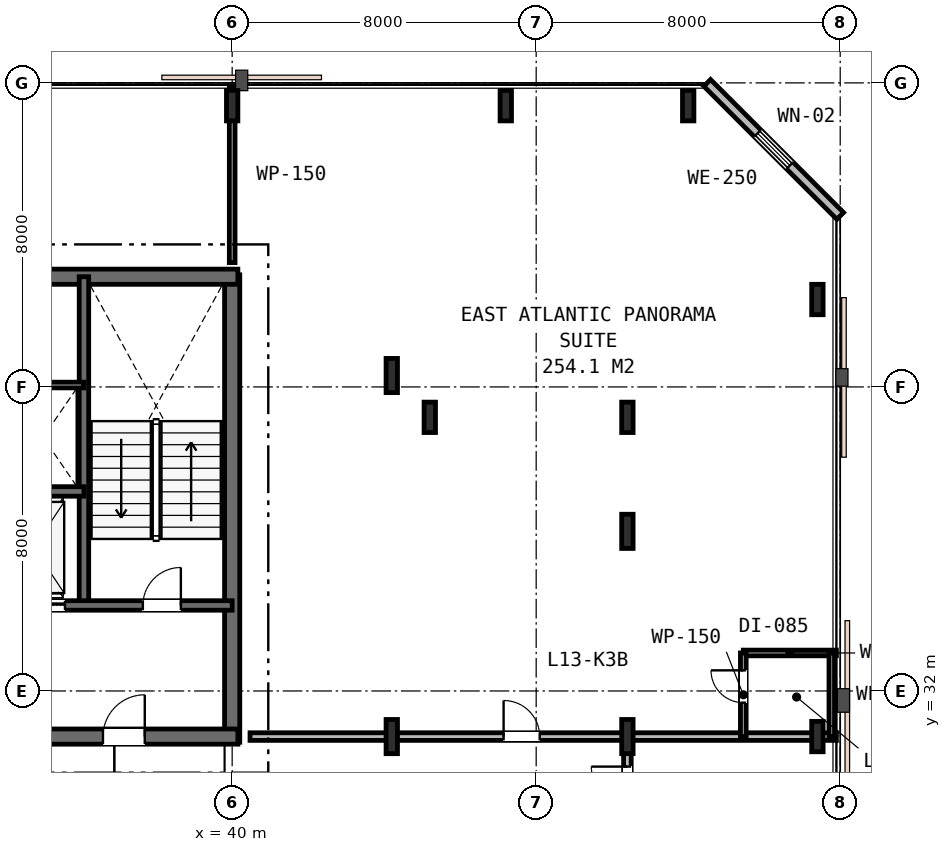
"""IFC4 building model, lengths in metres.
Left out: names, types, materials, properties, quantities, classifications, styles, units other than length and angle.
Written with IfcOpenShell. Run it as: python <this file> out.ifc"""

import sys

from ifc_helpers import new_model, si_unit, direction, frame, frame_2d, origin, origin_2d, place, context, subcontext, project, spatial, rectangle, i_section, extrude, element, fill, save


model = new_model("IFC4")
c1 = context("Model", 3, precision=1e-05, world=origin(), true_north=direction((0.0, 1.0)))
c2 = subcontext(c1, "Body", "Model", "MODEL_VIEW")
j1 = project(units=[si_unit("LENGTHUNIT", "METRE"), si_unit("PLANEANGLEUNIT", "RADIAN")], contexts=[c1])
p1 = place(None, origin())
s1 = spatial("IfcSite", under=j1, at=p1, CompositionType="ELEMENT")
p2 = place(p1, origin())
s2 = spatial("IfcBuilding", under=s1, at=p2, CompositionType="ELEMENT")
p3 = place(p2, frame((0.0, 0.0, 54.6)))
s3 = spatial("IfcBuildingStorey", under=s2, at=p3, CompositionType="ELEMENT", Elevation=54.6)
p4 = place(p3, frame((40.0, 30.65, 0.0), z_axis=(0.0, 0.0, 1.0), x_axis=(0.0, 1.0, 0.0)))
e1 = element("IfcWall", 1, at=p4, inside=s3, PredefinedType="SHEAR", context=c2, shape_type="SweptSolid", body=[
    extrude(rectangle(XDim=12.3, YDim=0.4, at=frame_2d((6.15, 0.0))), origin(), (0.0, 0.0, 1.0), 3.6),
])
p5 = place(p3, frame((15.85, 42.9, 0.0), z_axis=(0.0, 0.0, 1.0), x_axis=(1.0, 0.0, 0.0)))
e2 = element("IfcWall", 2, at=p5, inside=s3, PredefinedType="SHEAR", context=c2, shape_type="SweptSolid", body=[
    extrude(rectangle(XDim=24.3, YDim=0.4, at=frame_2d((12.15, 0.0))), origin(), (0.0, 0.0, 1.0), 3.6),
])
p6 = place(p3, frame((28.95, 30.8, 0.0), z_axis=(0.0, 0.0, 1.0), x_axis=(1.0, 0.0, 0.0)))
e3 = element("IfcWall", 3, at=p6, inside=s3, PredefinedType="SHEAR", context=c2, shape_type="SweptSolid", body=[
    extrude(rectangle(XDim=11.2, YDim=0.4, at=frame_2d((5.6, 0.0))), origin(), (0.0, 0.0, 1.0), 3.6),
])
p7 = place(p6, frame((7.65, 0.0, 0.0)))
e4 = element("IfcOpeningElement", 4, at=p7, cuts=e3, PredefinedType="OPENING", context=c2, shape_type="SweptSolid", body=[
    extrude(rectangle(XDim=1.1, YDim=2.15, at=frame_2d((0.55, 1.075))), frame((0.0, 0.21, 0.0), z_axis=(0.0, -1.0, 0.0), x_axis=(1.0, 0.0, 0.0)), (0.0, 0.0, 1.0), 0.42),
])
p8 = place(p3, frame((36.1, 34.25, 0.0), z_axis=(0.0, 0.0, 1.0), x_axis=(0.0, 1.0, 0.0)))
e5 = element("IfcWall", 5, at=p8, inside=s3, PredefinedType="SHEAR", context=c2, shape_type="SweptSolid", body=[
    extrude(rectangle(XDim=8.65, YDim=0.25, at=frame_2d((4.325, 0.0))), origin(), (0.0, 0.0, 1.0), 3.6),
])
p9 = place(p3, frame((33.95, 34.25, 0.0), z_axis=(0.0, 0.0, 1.0), x_axis=(1.0, 0.0, 0.0)))
e6 = element("IfcWall", 6, at=p9, inside=s3, PredefinedType="SHEAR", context=c2, shape_type="SweptSolid", body=[
    extrude(rectangle(XDim=6.05, YDim=0.25, at=frame_2d((3.025, 0.0))), origin(), (0.0, 0.0, 1.0), 3.6),
])
p10 = place(p9, frame((3.7, 0.0, 0.0)))
e7 = element("IfcOpeningElement", 7, at=p10, cuts=e6, PredefinedType="OPENING", context=c2, shape_type="SweptSolid", body=[
    extrude(rectangle(XDim=1.0, YDim=2.15, at=frame_2d((0.5, 1.075))), frame((0.0, 0.135, 0.0), z_axis=(0.0, -1.0, 0.0), x_axis=(1.0, 0.0, 0.0)), (0.0, 0.0, 1.0), 0.27),
])
p11 = place(p9, frame((0.55, 0.0, 0.0)))
e8 = element("IfcOpeningElement", 8, at=p11, cuts=e6, PredefinedType="OPENING", context=c2, shape_type="SweptSolid", body=[
    extrude(rectangle(XDim=1.1, YDim=2.15, at=frame_2d((0.55, 1.075))), frame((0.0, 0.135, 0.0), z_axis=(0.0, -1.0, 0.0), x_axis=(1.0, 0.0, 0.0)), (0.0, 0.0, 1.0), 0.27),
])
p12 = place(p3, frame((19.9, 37.25, 0.0), z_axis=(0.0, 0.0, 1.0), x_axis=(1.0, 0.0, 0.0)))
e9 = element("IfcWall", 9, at=p12, inside=s3, PredefinedType="SHEAR", context=c2, shape_type="SweptSolid", body=[
    extrude(rectangle(XDim=16.2, YDim=0.25, at=frame_2d((8.1, 0.0))), origin(), (0.0, 0.0, 1.0), 3.6),
])
p13 = place(p12, frame((12.55, 0.0, 0.0)))
e10 = element("IfcOpeningElement", 10, at=p13, cuts=e9, PredefinedType="OPENING", context=c2, shape_type="SweptSolid", body=[
    extrude(rectangle(XDim=0.9, YDim=2.15, at=frame_2d((0.45, 1.075))), frame((0.0, 0.135, 0.0), z_axis=(0.0, -1.0, 0.0), x_axis=(1.0, 0.0, 0.0)), (0.0, 0.0, 1.0), 0.27),
])
for number, where, z_axis, x_axis in (
    (11, (45.2, 39.2, 0.0), (0.0, 0.0, 1.0), (1.0, 0.0, 0.0)),
    (12, (40.0, 47.4, 0.0), (0.0, 0.0, 1.0), (1.0, 0.0, 0.0)),
    (13, (47.2, 47.4, 0.0), (0.0, 0.0, 1.0), (1.0, 0.0, 0.0)),
    (14, (50.4, 39.2, 0.0), (0.0, 0.0, 1.0), (1.0, 0.0, 0.0)),
    (15, (55.4, 30.8, 0.0), (0.0, 0.0, 1.0), (1.0, 0.0, 0.0)),
    (16, (55.4, 42.3, 0.0), (0.0, 0.0, 1.0), (1.0, 0.0, 0.0)),
    (17, (52.0, 47.4, 0.0), (0.0, 0.0, 1.0), (1.0, 0.0, 0.0)),
):
    element("IfcColumn", number, at=place(p3, frame(where, z_axis=z_axis, x_axis=x_axis)), inside=s3, PredefinedType="COLUMN", context=c2, shape_type="SweptSolid", body=[
        extrude(i_section(OverallWidth=0.3, OverallDepth=0.8, WebThickness=0.018, FlangeThickness=0.033, FilletRadius=0.03, at=origin_2d()), origin(), (0.0, 0.0, 1.0), 3.6),
    ])
for number, where, z_axis, x_axis in (
    (18, (44.2, 30.8, 0.0), (0.0, 0.0, 1.0), (1.0, 0.0, 0.0)),
    (19, (44.2, 40.3, 0.0), (0.0, 0.0, 1.0), (1.0, 0.0, 0.0)),
    (20, (50.4, 30.8, 0.0), (0.0, 0.0, 1.0), (1.0, 0.0, 0.0)),
    (21, (50.4, 36.2, 0.0), (0.0, 0.0, 1.0), (1.0, 0.0, 0.0)),
):
    element("IfcColumn", number, at=place(p3, frame(where, z_axis=z_axis, x_axis=x_axis)), inside=s3, PredefinedType="COLUMN", context=c2, shape_type="SweptSolid", body=[
        extrude(i_section(OverallWidth=0.3, OverallDepth=0.9, WebThickness=0.018, FlangeThickness=0.035, FilletRadius=0.03, at=origin_2d()), origin(), (0.0, 0.0, 1.0), 3.6),
    ])
p14 = place(p3, frame((56.0, 44.5, 0.0), z_axis=(0.0, 0.0, 1.0), x_axis=(-0.707106781187, 0.707106781187, 0.0)))
e22 = element("IfcWall", 22, at=p14, inside=s3, PredefinedType="STANDARD", context=c2, shape_type="SweptSolid", body=[
    extrude(rectangle(XDim=4.95, YDim=0.25, at=frame_2d((2.475, 0.0))), origin(), (0.0, 0.0, 1.0), 3.33),
])
p15 = place(p14, frame((1.875, 0.0, 0.85)))
e23 = element("IfcOpeningElement", 23, at=p15, cuts=e22, PredefinedType="OPENING", context=c2, shape_type="SweptSolid", body=[
    extrude(rectangle(XDim=1.2, YDim=1.6, at=frame_2d((0.6, 0.8))), frame((0.0, 0.135, 0.0), z_axis=(0.0, -1.0, 0.0), x_axis=(1.0, 0.0, 0.0)), (0.0, 0.0, 1.0), 0.27),
])
p16 = place(p3, frame((34.05, 40.05, 0.0), z_axis=(0.0, 0.0, 1.0), x_axis=(1.0, 0.0, 0.0)))
e24 = element("IfcWall", 24, at=p16, inside=s3, PredefinedType="PARTITIONING", context=c2, shape_type="SweptSolid", body=[
    extrude(rectangle(XDim=2.05, YDim=0.15, at=frame_2d((1.025, 0.0))), origin(), (0.0, 0.0, 1.0), 3.33),
])
p17 = place(p3, frame((40.0, 43.27, 0.0), z_axis=(0.0, 0.0, 1.0), x_axis=(0.0, 1.0, 0.0)))
e25 = element("IfcWall", 25, at=p17, inside=s3, PredefinedType="PARTITIONING", context=c2, shape_type="SweptSolid", body=[
    extrude(rectangle(XDim=4.63, YDim=0.15, at=frame_2d((2.315, 0.0))), origin(), (0.0, 0.0, 1.0), 2.93),
])
p18 = place(p3, frame((40.47, 30.8, 0.0), z_axis=(0.0, 0.0, 1.0), x_axis=(1.0, 0.0, 0.0)))
e26 = element("IfcWall", 26, at=p18, inside=s3, PredefinedType="PARTITIONING", context=c2, shape_type="SweptSolid", body=[
    extrude(rectangle(XDim=15.43, YDim=0.2, at=frame_2d((7.715, 0.0))), origin(), (0.0, 0.0, 1.0), 2.82),
])
p19 = place(p18, frame((6.673, 0.0, 0.0)))
e27 = element("IfcOpeningElement", 27, at=p19, cuts=e26, PredefinedType="OPENING", context=c2, shape_type="SweptSolid", body=[
    extrude(rectangle(XDim=0.95, YDim=2.15, at=frame_2d((0.475, 1.075))), frame((0.0, 0.11, 0.0), z_axis=(0.0, -1.0, 0.0), x_axis=(1.0, 0.0, 0.0)), (0.0, 0.0, 1.0), 0.22),
])
p20 = place(p3, frame((53.45, 33.0, 0.0), z_axis=(0.0, 0.0, 1.0), x_axis=(1.0, 0.0, 0.0)))
e28 = element("IfcWall", 28, at=p20, inside=s3, PredefinedType="PARTITIONING", context=c2, shape_type="SweptSolid", body=[
    extrude(rectangle(XDim=2.45, YDim=0.15, at=frame_2d((1.225, 0.0))), origin(), (0.0, 0.0, 1.0), 2.93),
])
p21 = place(p3, frame((53.45, 30.8, 0.0), z_axis=(0.0, 0.0, 1.0), x_axis=(0.0, 1.0, 0.0)))
e29 = element("IfcWall", 29, at=p21, inside=s3, PredefinedType="PARTITIONING", context=c2, shape_type="SweptSolid", body=[
    extrude(rectangle(XDim=2.2, YDim=0.15, at=frame_2d((1.1, 0.0))), origin(), (0.0, 0.0, 1.0), 2.82),
])
p22 = place(p21, frame((0.892, 0.0, 0.0)))
e30 = element("IfcOpeningElement", 30, at=p22, cuts=e29, PredefinedType="OPENING", context=c2, shape_type="SweptSolid", body=[
    extrude(rectangle(XDim=0.85, YDim=2.15, at=frame_2d((0.425, 1.075))), frame((0.0, 0.085, 0.0), z_axis=(0.0, -1.0, 0.0), x_axis=(1.0, 0.0, 0.0)), (0.0, 0.0, 1.0), 0.17),
])
p23 = place(p3, frame((55.78, 33.0, 0.0), z_axis=(0.0, 0.0, 1.0), x_axis=(0.0, -1.0, 0.0)))
e31 = element("IfcWall", 31, at=p23, inside=s3, PredefinedType="PARTITIONING", context=c2, shape_type="SweptSolid", body=[
    extrude(rectangle(XDim=2.2, YDim=0.15, at=frame_2d((1.1, 0.0))), origin(), (0.0, 0.0, 1.0), 2.82),
])
p24 = place(p3, frame((50.4, 28.6, 0.0), z_axis=(0.0, 0.0, 1.0), x_axis=(0.0, 1.0, 0.0)))
e32 = element("IfcWall", 32, at=p24, inside=s3, PredefinedType="PARTITIONING", context=c2, shape_type="SweptSolid", body=[
    extrude(rectangle(XDim=2.2, YDim=0.2, at=frame_2d((1.1, 0.0))), origin(), (0.0, 0.0, 1.0), 2.82),
])
p25 = place(p24, frame((0.46, 0.0, 0.0)))
e33 = element("IfcOpeningElement", 33, at=p25, cuts=e32, PredefinedType="OPENING", context=c2, shape_type="SweptSolid", body=[
    extrude(rectangle(XDim=0.95, YDim=2.15, at=frame_2d((0.475, 1.075))), frame((0.0, 0.11, 0.0), z_axis=(0.0, -1.0, 0.0), x_axis=(1.0, 0.0, 0.0)), (0.0, 0.0, 1.0), 0.22),
])
p26 = place(p15, origin())
e34 = element("IfcWindow", 34, at=p26, inside=s3, PartitioningType="SINGLE_PANEL", PredefinedType="WINDOW", context=c2, shape_type="SweptSolid", body=[
    extrude(rectangle(XDim=1.2, YDim=1.6, at=frame_2d((0.6, 0.8))), frame((0.0, 0.03, 0.0), z_axis=(0.0, -1.0, 0.0), x_axis=(1.0, 0.0, 0.0)), (0.0, 0.0, 1.0), 0.06),
])
fill(e23, e34)
p27 = place(p10, origin())
e35 = element("IfcDoor", 35, at=p27, inside=s3, OperationType="SINGLE_SWING_RIGHT", PredefinedType="DOOR", context=c2, shape_type="SweptSolid", body=[
    extrude(rectangle(XDim=1.0, YDim=2.15, at=frame_2d((0.5, 1.075))), frame((0.0, 0.025, 0.0), z_axis=(0.0, -1.0, 0.0), x_axis=(1.0, 0.0, 0.0)), (0.0, 0.0, 1.0), 0.05),
])
fill(e7, e35)
p28 = place(p7, origin())
e36 = element("IfcDoor", 36, at=p28, inside=s3, OperationType="SINGLE_SWING_RIGHT", PredefinedType="DOOR", context=c2, shape_type="SweptSolid", body=[
    extrude(rectangle(XDim=1.1, YDim=2.15, at=frame_2d((0.55, 1.075))), frame((0.0, 0.025, 0.0), z_axis=(0.0, -1.0, 0.0), x_axis=(1.0, 0.0, 0.0)), (0.0, 0.0, 1.0), 0.05),
])
fill(e4, e36)
p29 = place(p19, origin())
e37 = element("IfcDoor", 37, at=p29, inside=s3, OperationType="SINGLE_SWING_LEFT", PredefinedType="DOOR", context=c2, shape_type="SweptSolid", body=[
    extrude(rectangle(XDim=0.95, YDim=2.15, at=frame_2d((0.475, 1.075))), frame((0.0, 0.025, 0.0), z_axis=(0.0, -1.0, 0.0), x_axis=(1.0, 0.0, 0.0)), (0.0, 0.0, 1.0), 0.05),
])
fill(e27, e37)
p30 = place(p22, origin())
e38 = element("IfcDoor", 38, at=p30, inside=s3, OperationType="SINGLE_SWING_RIGHT", PredefinedType="DOOR", context=c2, shape_type="SweptSolid", body=[
    extrude(rectangle(XDim=0.85, YDim=2.15, at=frame_2d((0.425, 1.075))), frame((0.0, 0.025, 0.0), z_axis=(0.0, -1.0, 0.0), x_axis=(1.0, 0.0, 0.0)), (0.0, 0.0, 1.0), 0.05),
])
fill(e30, e38)
p31 = place(p25, origin())
e39 = element("IfcDoor", 39, at=p31, inside=s3, OperationType="SINGLE_SWING_RIGHT", PredefinedType="DOOR", context=c2, shape_type="SweptSolid", body=[
    extrude(rectangle(XDim=0.95, YDim=2.15, at=frame_2d((0.475, 1.075))), frame((0.0, 0.025, 0.0), z_axis=(0.0, -1.0, 0.0), x_axis=(1.0, 0.0, 0.0)), (0.0, 0.0, 1.0), 0.05),
])
fill(e33, e39)
p32 = place(p11, origin())
e40 = element("IfcDoor", 40, at=p32, inside=s3, OperationType="DOUBLE_DOOR_SLIDING", PredefinedType="DOOR", context=c2, shape_type="SweptSolid", body=[
    extrude(rectangle(XDim=1.1, YDim=2.15, at=frame_2d((0.55, 1.075))), frame((0.0, 0.025, 0.0), z_axis=(0.0, -1.0, 0.0), x_axis=(1.0, 0.0, 0.0)), (0.0, 0.0, 1.0), 0.05),
])
fill(e8, e40)
save(model, sys.argv[1])
